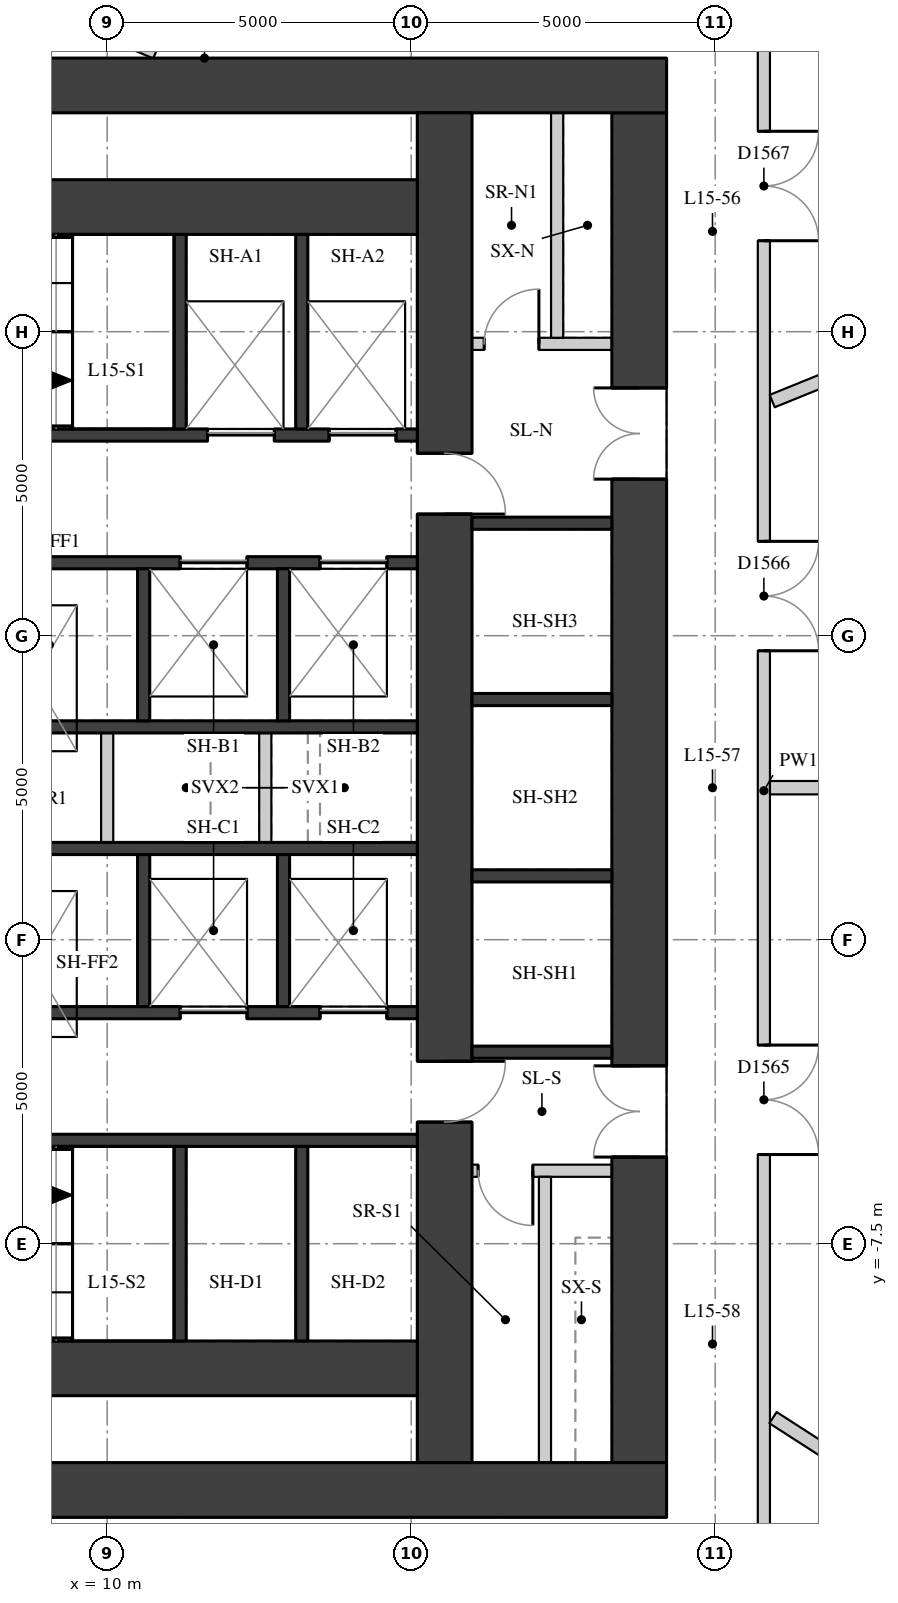
"""IFC4 building model, lengths in metres.
Left out: names, types, materials, properties, quantities, classifications, styles, units other than length and angle.
Written with IfcOpenShell. Run it as: python <this file> out.ifc"""

import sys

from ifc_helpers import new_model, si_unit, direction, frame, frame_2d, origin, place, context, subcontext, project, spatial, rectangle, extrude, element, fill, save


model = new_model("IFC4")
c1 = context("Model", 3, precision=1e-05, world=origin(), true_north=direction((0.0, 1.0)))
c2 = subcontext(c1, "Body", "Model", "MODEL_VIEW")
j1 = project(units=[si_unit("LENGTHUNIT", "METRE"), si_unit("PLANEANGLEUNIT", "RADIAN")], contexts=[c1])
p1 = place(None, origin())
s1 = spatial("IfcSite", under=j1, at=p1, CompositionType="ELEMENT")
p2 = place(p1, origin())
s2 = spatial("IfcBuilding", under=s1, at=p2, CompositionType="ELEMENT")
p3 = place(p2, frame((0.0, 0.0, 58.0)))
s3 = spatial("IfcBuildingStorey", under=s2, at=p3, CompositionType="ELEMENT", Elevation=58.0)
p4 = place(p3, frame((18.75, -11.1, 0.0), z_axis=(0.0, 0.0, 1.0), x_axis=(0.0, 1.0, 0.0)))
e1 = element("IfcWall", 1, at=p4, inside=s3, PredefinedType="SHEAR", context=c2, shape_type="SweptSolid", body=[
    extrude(rectangle(XDim=22.2, YDim=0.9, at=frame_2d((11.1, 0.0))), origin(), (0.0, 0.0, 1.0), 3.02),
])
p5 = place(p4, frame((16.175, 0.0, 0.0)))
e2 = element("IfcOpeningElement", 2, at=p5, cuts=e1, PredefinedType="OPENING", context=c2, shape_type="SweptSolid", body=[
    extrude(rectangle(XDim=1.5, YDim=2.1, at=frame_2d((0.75, 1.05))), frame((0.0, 0.46, 0.0), z_axis=(0.0, -1.0, 0.0), x_axis=(1.0, 0.0, 0.0)), (0.0, 0.0, 1.0), 0.92),
])
p6 = place(p4, frame((5.025, 0.0, 0.0)))
e3 = element("IfcOpeningElement", 3, at=p6, cuts=e1, PredefinedType="OPENING", context=c2, shape_type="SweptSolid", body=[
    extrude(rectangle(XDim=1.5, YDim=2.1, at=frame_2d((0.75, 1.05))), frame((0.0, 0.46, 0.0), z_axis=(0.0, -1.0, 0.0), x_axis=(1.0, 0.0, 0.0)), (0.0, 0.0, 1.0), 0.92),
])
for number, where, z_axis, x_axis in (
    (4, (4.0, 11.55, 0.0), (0.0, 0.0, 1.0), (1.0, 0.0, 0.0)),
    (5, (4.0, -11.55, 0.0), (0.0, 0.0, 1.0), (1.0, 0.0, 0.0)),
):
    element("IfcWall", number, at=place(p3, frame(where, z_axis=z_axis, x_axis=x_axis)), inside=s3, PredefinedType="SHEAR", context=c2, shape_type="SweptSolid", body=[
        extrude(rectangle(XDim=15.2, YDim=0.9, at=frame_2d((7.6, 0.0))), origin(), (0.0, 0.0, 1.0), 3.02),
    ])
p7 = place(p3, frame((15.55, -11.1, 0.0), z_axis=(0.0, 0.0, 1.0), x_axis=(0.0, 1.0, 0.0)))
e6 = element("IfcWall", 6, at=p7, inside=s3, PredefinedType="SHEAR", context=c2, shape_type="SweptSolid", body=[
    extrude(rectangle(XDim=22.2, YDim=0.9, at=frame_2d((11.1, 0.0))), origin(), (0.0, 0.0, 1.0), 3.02),
])
p8 = place(p7, frame((15.6, 0.0, 0.0)))
e7 = element("IfcOpeningElement", 7, at=p8, cuts=e6, PredefinedType="OPENING", context=c2, shape_type="SweptSolid", body=[
    extrude(rectangle(XDim=1.0, YDim=2.1, at=frame_2d((0.5, 1.05))), frame((0.0, 0.46, 0.0), z_axis=(0.0, -1.0, 0.0), x_axis=(1.0, 0.0, 0.0)), (0.0, 0.0, 1.0), 0.92),
])
p9 = place(p7, frame((5.6, 0.0, 0.0)))
e8 = element("IfcOpeningElement", 8, at=p9, cuts=e6, PredefinedType="OPENING", context=c2, shape_type="SweptSolid", body=[
    extrude(rectangle(XDim=1.0, YDim=2.1, at=frame_2d((0.5, 1.05))), frame((0.0, 0.46, 0.0), z_axis=(0.0, -1.0, 0.0), x_axis=(1.0, 0.0, 0.0)), (0.0, 0.0, 1.0), 0.92),
])
for number, where, z_axis, x_axis in (
    (9, (4.9, 9.55, 0.0), (0.0, 0.0, 1.0), (1.0, 0.0, 0.0)),
    (10, (4.9, -9.55, 0.0), (0.0, 0.0, 1.0), (1.0, 0.0, 0.0)),
):
    element("IfcWall", number, at=place(p3, frame(where, z_axis=z_axis, x_axis=x_axis)), inside=s3, PredefinedType="SHEAR", context=c2, shape_type="SweptSolid", body=[
        extrude(rectangle(XDim=10.2, YDim=0.9, at=frame_2d((5.1, 0.0))), origin(), (0.0, 0.0, 1.0), 3.02),
    ])
p10 = place(p3, frame((4.9, 5.8, 0.0), z_axis=(0.0, 0.0, 1.0), x_axis=(1.0, 0.0, 0.0)))
e11 = element("IfcWall", 11, at=p10, inside=s3, PredefinedType="SHEAR", context=c2, shape_type="SweptSolid", body=[
    extrude(rectangle(XDim=10.2, YDim=0.2, at=frame_2d((5.1, 0.0))), origin(), (0.0, 0.0, 1.0), 3.02),
])
p11 = place(p10, frame((6.75, 0.0, 0.0)))
e12 = element("IfcOpeningElement", 12, at=p11, cuts=e11, PredefinedType="OPENING", context=c2, shape_type="SweptSolid", body=[
    extrude(rectangle(XDim=1.1, YDim=2.1, at=frame_2d((0.55, 1.05))), frame((0.0, 0.11, 0.0), z_axis=(0.0, -1.0, 0.0), x_axis=(1.0, 0.0, 0.0)), (0.0, 0.0, 1.0), 0.22),
])
p12 = place(p10, frame((8.75, 0.0, 0.0)))
e13 = element("IfcOpeningElement", 13, at=p12, cuts=e11, PredefinedType="OPENING", context=c2, shape_type="SweptSolid", body=[
    extrude(rectangle(XDim=1.1, YDim=2.1, at=frame_2d((0.55, 1.05))), frame((0.0, 0.11, 0.0), z_axis=(0.0, -1.0, 0.0), x_axis=(1.0, 0.0, 0.0)), (0.0, 0.0, 1.0), 0.22),
])
p13 = place(p3, frame((4.9, 3.7, 0.0), z_axis=(0.0, 0.0, 1.0), x_axis=(1.0, 0.0, 0.0)))
e14 = element("IfcWall", 14, at=p13, inside=s3, PredefinedType="SHEAR", context=c2, shape_type="SweptSolid", body=[
    extrude(rectangle(XDim=10.2, YDim=0.2, at=frame_2d((5.1, 0.0))), origin(), (0.0, 0.0, 1.0), 3.02),
])
p14 = place(p13, frame((6.3, 0.0, 0.0)))
e15 = element("IfcOpeningElement", 15, at=p14, cuts=e14, PredefinedType="OPENING", context=c2, shape_type="SweptSolid", body=[
    extrude(rectangle(XDim=1.1, YDim=2.1, at=frame_2d((0.55, 1.05))), frame((0.0, 0.11, 0.0), z_axis=(0.0, -1.0, 0.0), x_axis=(1.0, 0.0, 0.0)), (0.0, 0.0, 1.0), 0.22),
])
p15 = place(p13, frame((8.6, 0.0, 0.0)))
e16 = element("IfcOpeningElement", 16, at=p15, cuts=e14, PredefinedType="OPENING", context=c2, shape_type="SweptSolid", body=[
    extrude(rectangle(XDim=1.1, YDim=2.1, at=frame_2d((0.55, 1.05))), frame((0.0, 0.11, 0.0), z_axis=(0.0, -1.0, 0.0), x_axis=(1.0, 0.0, 0.0)), (0.0, 0.0, 1.0), 0.22),
])
for number, where, z_axis, x_axis in (
    (17, (4.9, 1.0, 0.0), (0.0, 0.0, 1.0), (1.0, 0.0, 0.0)),
    (18, (4.9, -1.0, 0.0), (0.0, 0.0, 1.0), (1.0, 0.0, 0.0)),
):
    element("IfcWall", number, at=place(p3, frame(where, z_axis=z_axis, x_axis=x_axis)), inside=s3, PredefinedType="SHEAR", context=c2, shape_type="SweptSolid", body=[
        extrude(rectangle(XDim=10.2, YDim=0.2, at=frame_2d((5.1, 0.0))), origin(), (0.0, 0.0, 1.0), 3.02),
    ])
p16 = place(p3, frame((4.9, -3.7, 0.0), z_axis=(0.0, 0.0, 1.0), x_axis=(1.0, 0.0, 0.0)))
e19 = element("IfcWall", 19, at=p16, inside=s3, PredefinedType="SHEAR", context=c2, shape_type="SweptSolid", body=[
    extrude(rectangle(XDim=10.2, YDim=0.2, at=frame_2d((5.1, 0.0))), origin(), (0.0, 0.0, 1.0), 3.02),
])
p17 = place(p16, frame((6.3, 0.0, 0.0)))
e20 = element("IfcOpeningElement", 20, at=p17, cuts=e19, PredefinedType="OPENING", context=c2, shape_type="SweptSolid", body=[
    extrude(rectangle(XDim=1.1, YDim=2.1, at=frame_2d((0.55, 1.05))), frame((0.0, 0.11, 0.0), z_axis=(0.0, -1.0, 0.0), x_axis=(1.0, 0.0, 0.0)), (0.0, 0.0, 1.0), 0.22),
])
p18 = place(p16, frame((8.6, 0.0, 0.0)))
e21 = element("IfcOpeningElement", 21, at=p18, cuts=e19, PredefinedType="OPENING", context=c2, shape_type="SweptSolid", body=[
    extrude(rectangle(XDim=1.1, YDim=2.1, at=frame_2d((0.55, 1.05))), frame((0.0, 0.11, 0.0), z_axis=(0.0, -1.0, 0.0), x_axis=(1.0, 0.0, 0.0)), (0.0, 0.0, 1.0), 0.22),
])
p19 = place(p3, frame((4.9, -5.8, 0.0), z_axis=(0.0, 0.0, 1.0), x_axis=(1.0, 0.0, 0.0)))
e22 = element("IfcWall", 22, at=p19, inside=s3, PredefinedType="SHEAR", context=c2, shape_type="SweptSolid", body=[
    extrude(rectangle(XDim=10.2, YDim=0.2, at=frame_2d((5.1, 0.0))), origin(), (0.0, 0.0, 1.0), 3.02),
])
for number, where, z_axis, x_axis in (
    (23, (11.2, 5.9, 0.0), (0.0, 0.0, 1.0), (0.0, 1.0, 0.0)),
    (24, (11.2, -9.1, 0.0), (0.0, 0.0, 1.0), (0.0, 1.0, 0.0)),
    (25, (13.2, 5.9, 0.0), (0.0, 0.0, 1.0), (0.0, 1.0, 0.0)),
    (26, (13.2, -9.1, 0.0), (0.0, 0.0, 1.0), (0.0, 1.0, 0.0)),
):
    element("IfcWall", number, at=place(p3, frame(where, z_axis=z_axis, x_axis=x_axis)), inside=s3, PredefinedType="SHEAR", context=c2, shape_type="SweptSolid", body=[
        extrude(rectangle(XDim=3.2, YDim=0.2, at=frame_2d((1.6, 0.0))), origin(), (0.0, 0.0, 1.0), 3.02),
    ])
for number, where, z_axis, x_axis in (
    (27, (10.6, 1.1, 0.0), (0.0, 0.0, 1.0), (0.0, 1.0, 0.0)),
    (28, (10.6, -3.6, 0.0), (0.0, 0.0, 1.0), (0.0, 1.0, 0.0)),
    (29, (12.9, 1.1, 0.0), (0.0, 0.0, 1.0), (0.0, 1.0, 0.0)),
    (30, (12.9, -3.6, 0.0), (0.0, 0.0, 1.0), (0.0, 1.0, 0.0)),
):
    element("IfcWall", number, at=place(p3, frame(where, z_axis=z_axis, x_axis=x_axis)), inside=s3, PredefinedType="SHEAR", context=c2, shape_type="SweptSolid", body=[
        extrude(rectangle(XDim=2.5, YDim=0.2, at=frame_2d((1.25, 0.0))), origin(), (0.0, 0.0, 1.0), 3.02),
    ])
for number, where, z_axis, x_axis in (
    (31, (10.0, -0.9, 0.0), (0.0, 0.0, 1.0), (0.0, 1.0, 0.0)),
    (32, (12.6, -0.9, 0.0), (0.0, 0.0, 1.0), (0.0, 1.0, 0.0)),
):
    element("IfcWall", number, at=place(p3, frame(where, z_axis=z_axis, x_axis=x_axis)), inside=s3, PredefinedType="PARTITIONING", context=c2, shape_type="SweptSolid", body=[
        extrude(rectangle(XDim=1.8, YDim=0.2, at=frame_2d((0.9, 0.0))), origin(), (0.0, 0.0, 1.0), 3.02),
    ])
for number, where, z_axis, x_axis in (
    (33, (16.0, -4.35, 0.0), (0.0, 0.0, 1.0), (1.0, 0.0, 0.0)),
    (34, (16.0, -1.45, 0.0), (0.0, 0.0, 1.0), (1.0, 0.0, 0.0)),
    (35, (16.0, 1.45, 0.0), (0.0, 0.0, 1.0), (1.0, 0.0, 0.0)),
    (36, (16.0, 4.35, 0.0), (0.0, 0.0, 1.0), (1.0, 0.0, 0.0)),
):
    element("IfcWall", number, at=place(p3, frame(where, z_axis=z_axis, x_axis=x_axis)), inside=s3, PredefinedType="SHEAR", context=c2, shape_type="SweptSolid", body=[
        extrude(rectangle(XDim=2.3, YDim=0.2, at=frame_2d((1.15, 0.0))), origin(), (0.0, 0.0, 1.0), 3.02),
    ])
p20 = place(p3, frame((16.0, 7.3, 0.0), z_axis=(0.0, 0.0, 1.0), x_axis=(1.0, 0.0, 0.0)))
e37 = element("IfcWall", 37, at=p20, inside=s3, PredefinedType="PARTITIONING", context=c2, shape_type="SweptSolid", body=[
    extrude(rectangle(XDim=2.3, YDim=0.2, at=frame_2d((1.15, 0.0))), origin(), (0.0, 0.0, 1.0), 3.02),
])
p21 = place(p20, frame((0.2, 0.0, 0.0)))
e38 = element("IfcOpeningElement", 38, at=p21, cuts=e37, PredefinedType="OPENING", context=c2, shape_type="SweptSolid", body=[
    extrude(rectangle(XDim=0.9, YDim=2.1, at=frame_2d((0.45, 1.05))), frame((0.0, 0.11, 0.0), z_axis=(0.0, -1.0, 0.0), x_axis=(1.0, 0.0, 0.0)), (0.0, 0.0, 1.0), 0.22),
])
p22 = place(p3, frame((17.4, 7.4, 0.0), z_axis=(0.0, 0.0, 1.0), x_axis=(0.0, 1.0, 0.0)))
e39 = element("IfcWall", 39, at=p22, inside=s3, PredefinedType="PARTITIONING", context=c2, shape_type="SweptSolid", body=[
    extrude(rectangle(XDim=3.7, YDim=0.2, at=frame_2d((1.85, 0.0))), origin(), (0.0, 0.0, 1.0), 3.02),
])
p23 = place(p3, frame((16.0, -6.3, 0.0), z_axis=(0.0, 0.0, 1.0), x_axis=(1.0, 0.0, 0.0)))
e40 = element("IfcWall", 40, at=p23, inside=s3, PredefinedType="PARTITIONING", context=c2, shape_type="SweptSolid", body=[
    extrude(rectangle(XDim=2.3, YDim=0.2, at=frame_2d((1.15, 0.0))), origin(), (0.0, 0.0, 1.0), 3.02),
])
p24 = place(p23, frame((0.1, 0.0, 0.0)))
e41 = element("IfcOpeningElement", 41, at=p24, cuts=e40, PredefinedType="OPENING", context=c2, shape_type="SweptSolid", body=[
    extrude(rectangle(XDim=0.9, YDim=2.1, at=frame_2d((0.45, 1.05))), frame((0.0, 0.11, 0.0), z_axis=(0.0, -1.0, 0.0), x_axis=(1.0, 0.0, 0.0)), (0.0, 0.0, 1.0), 0.22),
])
p25 = place(p3, frame((17.2, -11.1, 0.0), z_axis=(0.0, 0.0, 1.0), x_axis=(0.0, 1.0, 0.0)))
e42 = element("IfcWall", 42, at=p25, inside=s3, PredefinedType="PARTITIONING", context=c2, shape_type="SweptSolid", body=[
    extrude(rectangle(XDim=4.7, YDim=0.2, at=frame_2d((2.35, 0.0))), origin(), (0.0, 0.0, 1.0), 3.02),
])
p26 = place(p3, frame((20.8, 13.5, 0.0), z_axis=(0.0, 0.0, 1.0), x_axis=(0.0, -1.0, 0.0)))
e43 = element("IfcWall", 43, at=p26, inside=s3, PredefinedType="PARTITIONING", context=c2, shape_type="SweptSolid", body=[
    extrude(rectangle(XDim=27.1, YDim=0.2, at=frame_2d((13.55, 0.0))), origin(), (0.0, 0.0, 1.0), 3.02),
])
p27 = place(p26, frame((17.733, 0.0, 0.0)))
e44 = element("IfcOpeningElement", 44, at=p27, cuts=e43, PredefinedType="OPENING", context=c2, shape_type="SweptSolid", body=[
    extrude(rectangle(XDim=1.8, YDim=2.1, at=frame_2d((0.9, 1.05))), frame((0.0, 0.11, 0.0), z_axis=(0.0, -1.0, 0.0), x_axis=(1.0, 0.0, 0.0)), (0.0, 0.0, 1.0), 0.22),
])
p28 = place(p26, frame((9.448, 0.0, 0.0)))
e45 = element("IfcOpeningElement", 45, at=p28, cuts=e43, PredefinedType="OPENING", context=c2, shape_type="SweptSolid", body=[
    extrude(rectangle(XDim=1.8, YDim=2.1, at=frame_2d((0.9, 1.05))), frame((0.0, 0.11, 0.0), z_axis=(0.0, -1.0, 0.0), x_axis=(1.0, 0.0, 0.0)), (0.0, 0.0, 1.0), 0.22),
])
p29 = place(p26, frame((2.704, 0.0, 0.0)))
e46 = element("IfcOpeningElement", 46, at=p29, cuts=e43, PredefinedType="OPENING", context=c2, shape_type="SweptSolid", body=[
    extrude(rectangle(XDim=1.8, YDim=2.1, at=frame_2d((0.9, 1.05))), frame((0.0, 0.11, 0.0), z_axis=(0.0, -1.0, 0.0), x_axis=(1.0, 0.0, 0.0)), (0.0, 0.0, 1.0), 0.22),
])
p30 = place(p3, frame((5.149, 14.456, 0.0), z_axis=(0.0, 0.0, 1.0), x_axis=(0.920541383735, -0.390645057348, 0.0)))
e47 = element("IfcWall", 47, at=p30, inside=s3, PredefinedType="PARTITIONING", context=c2, shape_type="SweptSolid", body=[
    extrude(rectangle(XDim=6.124, YDim=0.15, at=frame_2d((3.062, 0.0))), origin(), (0.0, 0.0, 1.0), 3.02),
])
p31 = place(p30, frame((2.508, 0.0, 0.0)))
e48 = element("IfcOpeningElement", 48, at=p31, cuts=e47, PredefinedType="OPENING", context=c2, shape_type="SweptSolid", body=[
    extrude(rectangle(XDim=0.9, YDim=2.1, at=frame_2d((0.45, 1.05))), frame((0.0, 0.085, 0.0), z_axis=(0.0, -1.0, 0.0), x_axis=(1.0, 0.0, 0.0)), (0.0, 0.0, 1.0), 0.17),
])
p32 = place(p3, frame((27.5, 0.0, 0.0), z_axis=(0.0, 0.0, 1.0), x_axis=(-1.0, 0.0, 0.0)))
e49 = element("IfcWall", 49, at=p32, inside=s3, PredefinedType="PARTITIONING", context=c2, shape_type="SweptSolid", body=[
    extrude(rectangle(XDim=6.6, YDim=0.22, at=frame_2d((3.3, 0.0))), origin(), (0.0, 0.0, 1.0), 2.47),
])
p33 = place(p3, frame((25.851, 8.354, 0.0), z_axis=(0.0, 0.0, 1.0), x_axis=(-0.926546814299, -0.376179479653, 0.0)))
e50 = element("IfcWall", 50, at=p33, inside=s3, PredefinedType="PARTITIONING", context=c2, shape_type="SweptSolid", body=[
    extrude(rectangle(XDim=5.304, YDim=0.22, at=frame_2d((2.652, 0.0))), origin(), (0.0, 0.0, 1.0), 3.02),
])
p34 = place(p3, frame((23.835, -12.219, 0.0), z_axis=(0.0, 0.0, 1.0), x_axis=(-0.840694872373, 0.541509124176, 0.0)))
e51 = element("IfcWall", 51, at=p34, inside=s3, PredefinedType="PARTITIONING", context=c2, shape_type="SweptSolid", body=[
    extrude(rectangle(XDim=3.43, YDim=0.22, at=frame_2d((1.715, 0.0))), origin(), (0.0, 0.0, 1.0), 3.02),
])
p35 = place(p5, origin())
e52 = element("IfcDoor", 52, at=p35, inside=s3, OperationType="DOUBLE_DOOR_SINGLE_SWING", PredefinedType="DOOR", context=c2, shape_type="SweptSolid", body=[
    extrude(rectangle(XDim=1.5, YDim=2.1, at=frame_2d((0.75, 1.05))), frame((0.0, 0.025, 0.0), z_axis=(0.0, -1.0, 0.0), x_axis=(1.0, 0.0, 0.0)), (0.0, 0.0, 1.0), 0.05),
])
fill(e2, e52)
p36 = place(p6, origin())
e53 = element("IfcDoor", 53, at=p36, inside=s3, OperationType="DOUBLE_DOOR_SINGLE_SWING", PredefinedType="DOOR", context=c2, shape_type="SweptSolid", body=[
    extrude(rectangle(XDim=1.5, YDim=2.1, at=frame_2d((0.75, 1.05))), frame((0.0, 0.025, 0.0), z_axis=(0.0, -1.0, 0.0), x_axis=(1.0, 0.0, 0.0)), (0.0, 0.0, 1.0), 0.05),
])
fill(e3, e53)
p37 = place(p11, origin())
e54 = element("IfcDoor", 54, at=p37, inside=s3, OperationType="DOUBLE_DOOR_SLIDING", PredefinedType="DOOR", context=c2, shape_type="SweptSolid", body=[
    extrude(rectangle(XDim=1.1, YDim=2.1, at=frame_2d((0.55, 1.05))), frame((0.0, 0.025, 0.0), z_axis=(0.0, -1.0, 0.0), x_axis=(1.0, 0.0, 0.0)), (0.0, 0.0, 1.0), 0.05),
])
fill(e12, e54)
p38 = place(p12, origin())
e55 = element("IfcDoor", 55, at=p38, inside=s3, OperationType="DOUBLE_DOOR_SLIDING", PredefinedType="DOOR", context=c2, shape_type="SweptSolid", body=[
    extrude(rectangle(XDim=1.1, YDim=2.1, at=frame_2d((0.55, 1.05))), frame((0.0, 0.025, 0.0), z_axis=(0.0, -1.0, 0.0), x_axis=(1.0, 0.0, 0.0)), (0.0, 0.0, 1.0), 0.05),
])
fill(e13, e55)
p39 = place(p14, origin())
e56 = element("IfcDoor", 56, at=p39, inside=s3, OperationType="DOUBLE_DOOR_SLIDING", PredefinedType="DOOR", context=c2, shape_type="SweptSolid", body=[
    extrude(rectangle(XDim=1.1, YDim=2.1, at=frame_2d((0.55, 1.05))), frame((0.0, 0.025, 0.0), z_axis=(0.0, -1.0, 0.0), x_axis=(1.0, 0.0, 0.0)), (0.0, 0.0, 1.0), 0.05),
])
fill(e15, e56)
p40 = place(p15, origin())
e57 = element("IfcDoor", 57, at=p40, inside=s3, OperationType="DOUBLE_DOOR_SLIDING", PredefinedType="DOOR", context=c2, shape_type="SweptSolid", body=[
    extrude(rectangle(XDim=1.1, YDim=2.1, at=frame_2d((0.55, 1.05))), frame((0.0, 0.025, 0.0), z_axis=(0.0, -1.0, 0.0), x_axis=(1.0, 0.0, 0.0)), (0.0, 0.0, 1.0), 0.05),
])
fill(e16, e57)
p41 = place(p17, origin())
e58 = element("IfcDoor", 58, at=p41, inside=s3, OperationType="DOUBLE_DOOR_SLIDING", PredefinedType="DOOR", context=c2, shape_type="SweptSolid", body=[
    extrude(rectangle(XDim=1.1, YDim=2.1, at=frame_2d((0.55, 1.05))), frame((0.0, 0.025, 0.0), z_axis=(0.0, -1.0, 0.0), x_axis=(1.0, 0.0, 0.0)), (0.0, 0.0, 1.0), 0.05),
])
fill(e20, e58)
p42 = place(p18, origin())
e59 = element("IfcDoor", 59, at=p42, inside=s3, OperationType="DOUBLE_DOOR_SLIDING", PredefinedType="DOOR", context=c2, shape_type="SweptSolid", body=[
    extrude(rectangle(XDim=1.1, YDim=2.1, at=frame_2d((0.55, 1.05))), frame((0.0, 0.025, 0.0), z_axis=(0.0, -1.0, 0.0), x_axis=(1.0, 0.0, 0.0)), (0.0, 0.0, 1.0), 0.05),
])
fill(e21, e59)
p43 = place(p8, origin())
e60 = element("IfcDoor", 60, at=p43, inside=s3, OperationType="SINGLE_SWING_RIGHT", PredefinedType="DOOR", context=c2, shape_type="SweptSolid", body=[
    extrude(rectangle(XDim=1.0, YDim=2.1, at=frame_2d((0.5, 1.05))), frame((0.0, 0.025, 0.0), z_axis=(0.0, -1.0, 0.0), x_axis=(1.0, 0.0, 0.0)), (0.0, 0.0, 1.0), 0.05),
])
fill(e7, e60)
p44 = place(p21, origin())
e61 = element("IfcDoor", 61, at=p44, inside=s3, OperationType="SINGLE_SWING_RIGHT", PredefinedType="DOOR", context=c2, shape_type="SweptSolid", body=[
    extrude(rectangle(XDim=0.9, YDim=2.1, at=frame_2d((0.45, 1.05))), frame((0.0, 0.025, 0.0), z_axis=(0.0, -1.0, 0.0), x_axis=(1.0, 0.0, 0.0)), (0.0, 0.0, 1.0), 0.05),
])
fill(e38, e61)
p45 = place(p9, origin())
e62 = element("IfcDoor", 62, at=p45, inside=s3, OperationType="SINGLE_SWING_LEFT", PredefinedType="DOOR", context=c2, shape_type="SweptSolid", body=[
    extrude(rectangle(XDim=1.0, YDim=2.1, at=frame_2d((0.5, 1.05))), frame((0.0, 0.025, 0.0), z_axis=(0.0, -1.0, 0.0), x_axis=(1.0, 0.0, 0.0)), (0.0, 0.0, 1.0), 0.05),
])
fill(e8, e62)
p46 = place(p24, origin())
e63 = element("IfcDoor", 63, at=p46, inside=s3, OperationType="SINGLE_SWING_LEFT", PredefinedType="DOOR", context=c2, shape_type="SweptSolid", body=[
    extrude(rectangle(XDim=0.9, YDim=2.1, at=frame_2d((0.45, 1.05))), frame((0.0, 0.025, 0.0), z_axis=(0.0, -1.0, 0.0), x_axis=(1.0, 0.0, 0.0)), (0.0, 0.0, 1.0), 0.05),
])
fill(e41, e63)
p47 = place(p27, origin())
e64 = element("IfcDoor", 64, at=p47, inside=s3, OperationType="DOUBLE_DOOR_SINGLE_SWING", PredefinedType="DOOR", context=c2, shape_type="SweptSolid", body=[
    extrude(rectangle(XDim=1.8, YDim=2.1, at=frame_2d((0.9, 1.05))), frame((0.0, 0.025, 0.0), z_axis=(0.0, -1.0, 0.0), x_axis=(1.0, 0.0, 0.0)), (0.0, 0.0, 1.0), 0.05),
])
fill(e44, e64)
p48 = place(p28, origin())
e65 = element("IfcDoor", 65, at=p48, inside=s3, OperationType="DOUBLE_DOOR_SINGLE_SWING", PredefinedType="DOOR", context=c2, shape_type="SweptSolid", body=[
    extrude(rectangle(XDim=1.8, YDim=2.1, at=frame_2d((0.9, 1.05))), frame((0.0, 0.025, 0.0), z_axis=(0.0, -1.0, 0.0), x_axis=(1.0, 0.0, 0.0)), (0.0, 0.0, 1.0), 0.05),
])
fill(e45, e65)
p49 = place(p29, origin())
e66 = element("IfcDoor", 66, at=p49, inside=s3, OperationType="DOUBLE_DOOR_SINGLE_SWING", PredefinedType="DOOR", context=c2, shape_type="SweptSolid", body=[
    extrude(rectangle(XDim=1.8, YDim=2.1, at=frame_2d((0.9, 1.05))), frame((0.0, 0.025, 0.0), z_axis=(0.0, -1.0, 0.0), x_axis=(1.0, 0.0, 0.0)), (0.0, 0.0, 1.0), 0.05),
])
fill(e46, e66)
save(model, sys.argv[1])
